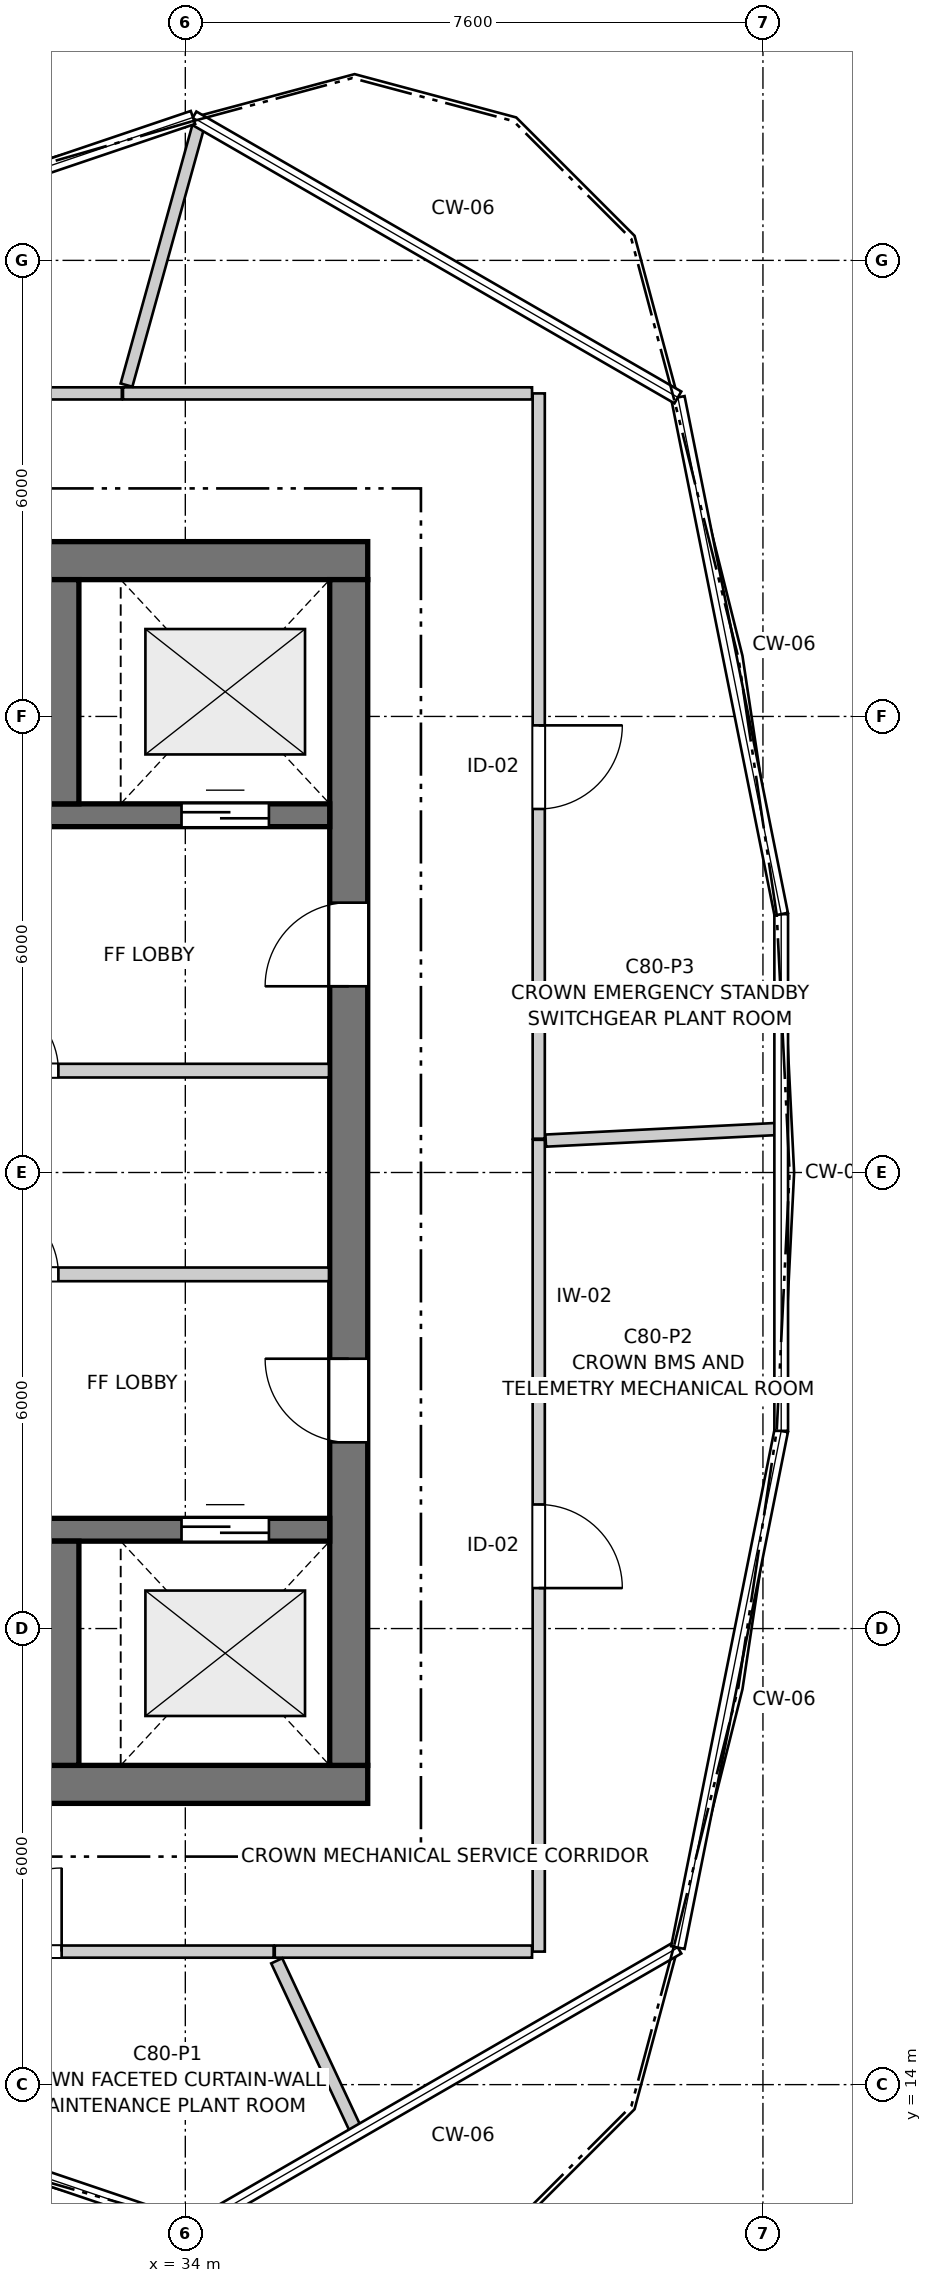
"""IFC4 building model, lengths in metres.
Left out: names, types, materials, properties, quantities, classifications, styles, units other than length and angle.
Written with IfcOpenShell. Run it as: python <this file> out.ifc"""

import sys

from ifc_helpers import new_model, si_unit, direction, frame, frame_2d, origin, place, context, subcontext, project, spatial, rectangle, extrude, source, transform, mapped, element, fill, save


model = new_model("IFC4")
c1 = context("Model", 3, precision=1e-05, world=origin(), true_north=direction((0.0, 1.0)))
c2 = subcontext(c1, "Body", "Model", "MODEL_VIEW")
j1 = project(units=[si_unit("LENGTHUNIT", "METRE"), si_unit("PLANEANGLEUNIT", "RADIAN")], contexts=[c1])
p1 = place(None, origin())
s1 = spatial("IfcSite", under=j1, at=p1, CompositionType="ELEMENT")
p2 = place(p1, origin())
s2 = spatial("IfcBuilding", under=s1, at=p2, CompositionType="ELEMENT")
p3 = place(p2, frame((0.0, 0.0, 270.4)))
s3 = spatial("IfcBuildingStorey", under=s2, at=p3, CompositionType="ELEMENT", Elevation=270.4)
for number, where, z_axis, x_axis in (
    (1, (24.3, 17.95, 0.0), (0.0, 0.0, 1.0), (1.0, 0.0, 0.0)),
    (2, (36.4, 34.05, 0.0), (0.0, 0.0, 1.0), (-1.0, 0.0, 0.0)),
):
    element("IfcWall", number, at=place(p3, frame(where, z_axis=z_axis, x_axis=x_axis)), inside=s3, PredefinedType="SHEAR", context=c2, shape_type="SweptSolid", body=[
        extrude(rectangle(XDim=12.1, YDim=0.5, at=frame_2d((6.05, 0.0))), origin(), (0.0, 0.0, 1.0), 4.05),
    ])
p4 = place(p3, frame((36.15, 18.2, 0.0), z_axis=(0.0, 0.0, 1.0), x_axis=(0.0, 1.0, 0.0)))
e3 = element("IfcWall", 3, at=p4, inside=s3, PredefinedType="SHEAR", context=c2, shape_type="SweptSolid", body=[
    extrude(rectangle(XDim=15.6, YDim=0.5, at=frame_2d((7.8, 0.0))), origin(), (0.0, 0.0, 1.0), 4.05),
])
p5 = place(p4, frame((4.25, 0.0, 0.0)))
e4 = element("IfcOpeningElement", 4, at=p5, cuts=e3, PredefinedType="OPENING", context=c2, shape_type="SweptSolid", body=[
    extrude(rectangle(XDim=1.1, YDim=2.15, at=frame_2d((0.55, 1.075))), frame((0.0, 0.26, 0.0), z_axis=(0.0, -1.0, 0.0), x_axis=(1.0, 0.0, 0.0)), (0.0, 0.0, 1.0), 0.52),
])
p6 = place(p4, frame((10.25, 0.0, 0.0)))
e5 = element("IfcOpeningElement", 5, at=p6, cuts=e3, PredefinedType="OPENING", context=c2, shape_type="SweptSolid", body=[
    extrude(rectangle(XDim=1.1, YDim=2.15, at=frame_2d((0.55, 1.075))), frame((0.0, 0.26, 0.0), z_axis=(0.0, -1.0, 0.0), x_axis=(1.0, 0.0, 0.0)), (0.0, 0.0, 1.0), 0.52),
])
p7 = place(p3, frame((24.8, 21.3, 0.0), z_axis=(0.0, 0.0, 1.0), x_axis=(1.0, 0.0, 0.0)))
e6 = element("IfcWall", 6, at=p7, inside=s3, PredefinedType="SHEAR", context=c2, shape_type="SweptSolid", body=[
    extrude(rectangle(XDim=11.1, YDim=0.3, at=frame_2d((5.55, 0.0))), origin(), (0.0, 0.0, 1.0), 4.05),
])
p8 = place(p7, frame((6.22, 0.0, 0.0)))
e7 = element("IfcOpeningElement", 7, at=p8, cuts=e6, PredefinedType="OPENING", context=c2, shape_type="SweptSolid", body=[
    extrude(rectangle(XDim=0.98, YDim=2.15, at=frame_2d((0.49, 1.075))), frame((0.0, 0.16, 0.0), z_axis=(0.0, -1.0, 0.0), x_axis=(1.0, 0.0, 0.0)), (0.0, 0.0, 1.0), 0.32),
])
p9 = place(p7, frame((9.15, 0.0, 0.0)))
e8 = element("IfcOpeningElement", 8, at=p9, cuts=e6, PredefinedType="OPENING", context=c2, shape_type="SweptSolid", body=[
    extrude(rectangle(XDim=1.15, YDim=2.15, at=frame_2d((0.575, 1.075))), frame((0.0, 0.16, 0.0), z_axis=(0.0, -1.0, 0.0), x_axis=(1.0, 0.0, 0.0)), (0.0, 0.0, 1.0), 0.32),
])
p10 = place(p3, frame((32.4, 18.2, 0.0), z_axis=(0.0, 0.0, 1.0), x_axis=(0.0, 1.0, 0.0)))
e9 = element("IfcWall", 9, at=p10, inside=s3, PredefinedType="SHEAR", context=c2, shape_type="SweptSolid", body=[
    extrude(rectangle(XDim=2.95, YDim=0.4, at=frame_2d((1.475, 0.0))), origin(), (0.0, 0.0, 1.0), 4.05),
])
p11 = place(p3, frame((24.8, 30.7, 0.0), z_axis=(0.0, 0.0, 1.0), x_axis=(1.0, 0.0, 0.0)))
e10 = element("IfcWall", 10, at=p11, inside=s3, PredefinedType="SHEAR", context=c2, shape_type="SweptSolid", body=[
    extrude(rectangle(XDim=11.1, YDim=0.3, at=frame_2d((5.55, 0.0))), origin(), (0.0, 0.0, 1.0), 4.05),
])
p12 = place(p11, frame((6.22, 0.0, 0.0)))
e11 = element("IfcOpeningElement", 11, at=p12, cuts=e10, PredefinedType="OPENING", context=c2, shape_type="SweptSolid", body=[
    extrude(rectangle(XDim=0.98, YDim=2.15, at=frame_2d((0.49, 1.075))), frame((0.0, 0.16, 0.0), z_axis=(0.0, -1.0, 0.0), x_axis=(1.0, 0.0, 0.0)), (0.0, 0.0, 1.0), 0.32),
])
p13 = place(p11, frame((9.15, 0.0, 0.0)))
e12 = element("IfcOpeningElement", 12, at=p13, cuts=e10, PredefinedType="OPENING", context=c2, shape_type="SweptSolid", body=[
    extrude(rectangle(XDim=1.15, YDim=2.15, at=frame_2d((0.575, 1.075))), frame((0.0, 0.16, 0.0), z_axis=(0.0, -1.0, 0.0), x_axis=(1.0, 0.0, 0.0)), (0.0, 0.0, 1.0), 0.32),
])
p14 = place(p3, frame((32.4, 30.85, 0.0), z_axis=(0.0, 0.0, 1.0), x_axis=(0.0, 1.0, 0.0)))
e13 = element("IfcWall", 13, at=p14, inside=s3, PredefinedType="SHEAR", context=c2, shape_type="SweptSolid", body=[
    extrude(rectangle(XDim=2.95, YDim=0.4, at=frame_2d((1.475, 0.0))), origin(), (0.0, 0.0, 1.0), 4.05),
])
p15 = place(p3, frame((30.67, 24.66, 0.0), z_axis=(0.0, 0.0, 1.0), x_axis=(1.0, 0.0, 0.0)))
e14 = element("IfcWall", 14, at=p15, inside=s3, PredefinedType="PARTITIONING", context=c2, shape_type="SweptSolid", body=[
    extrude(rectangle(XDim=5.22, YDim=0.18, at=frame_2d((2.61, 0.0))), origin(), (0.0, 0.0, 1.0), 4.05),
])
p16 = place(p15, frame((0.68, 0.0, 0.0)))
e15 = element("IfcOpeningElement", 15, at=p16, cuts=e14, PredefinedType="OPENING", context=c2, shape_type="SweptSolid", body=[
    extrude(rectangle(XDim=0.98, YDim=2.15, at=frame_2d((0.49, 1.075))), frame((0.0, 0.1, 0.0), z_axis=(0.0, -1.0, 0.0), x_axis=(1.0, 0.0, 0.0)), (0.0, 0.0, 1.0), 0.2),
])
p17 = place(p3, frame((30.67, 27.34, 0.0), z_axis=(0.0, 0.0, 1.0), x_axis=(1.0, 0.0, 0.0)))
e16 = element("IfcWall", 16, at=p17, inside=s3, PredefinedType="PARTITIONING", context=c2, shape_type="SweptSolid", body=[
    extrude(rectangle(XDim=5.22, YDim=0.18, at=frame_2d((2.61, 0.0))), origin(), (0.0, 0.0, 1.0), 4.05),
])
p18 = place(p17, frame((0.68, 0.0, 0.0)))
e17 = element("IfcOpeningElement", 17, at=p18, cuts=e16, PredefinedType="OPENING", context=c2, shape_type="SweptSolid", body=[
    extrude(rectangle(XDim=0.98, YDim=2.15, at=frame_2d((0.49, 1.075))), frame((0.0, 0.1, 0.0), z_axis=(0.0, -1.0, 0.0), x_axis=(1.0, 0.0, 0.0)), (0.0, 0.0, 1.0), 0.2),
])
p19 = place(p3, frame((38.65, 26.43, 0.0), z_axis=(0.0, 0.0, 1.0), x_axis=(0.0, -1.0, 0.0)))
e18 = element("IfcWall", 18, at=p19, inside=s3, PredefinedType="PARTITIONING", context=c2, shape_type="SweptSolid", body=[
    extrude(rectangle(XDim=10.68, YDim=0.16, at=frame_2d((5.34, 0.0))), origin(), (0.0, 0.0, 1.0), 4.05),
])
p20 = place(p19, frame((4.798, 0.0, 0.0)))
e19 = element("IfcOpeningElement", 19, at=p20, cuts=e18, PredefinedType="OPENING", context=c2, shape_type="SweptSolid", body=[
    extrude(rectangle(XDim=1.1, YDim=2.15, at=frame_2d((0.55, 1.075))), frame((0.0, 0.09, 0.0), z_axis=(0.0, -1.0, 0.0), x_axis=(1.0, 0.0, 0.0)), (0.0, 0.0, 1.0), 0.18),
])
p21 = place(p3, frame((38.65, 36.25, 0.0), z_axis=(0.0, 0.0, 1.0), x_axis=(0.0, -1.0, 0.0)))
e20 = element("IfcWall", 20, at=p21, inside=s3, PredefinedType="PARTITIONING", context=c2, shape_type="SweptSolid", body=[
    extrude(rectangle(XDim=9.805, YDim=0.16, at=frame_2d((4.902, 0.0))), origin(), (0.0, 0.0, 1.0), 4.05),
])
p22 = place(p21, frame((4.367, 0.0, 0.0)))
e21 = element("IfcOpeningElement", 21, at=p22, cuts=e20, PredefinedType="OPENING", context=c2, shape_type="SweptSolid", body=[
    extrude(rectangle(XDim=1.1, YDim=2.15, at=frame_2d((0.55, 1.075))), frame((0.0, 0.09, 0.0), z_axis=(0.0, -1.0, 0.0), x_axis=(1.0, 0.0, 0.0)), (0.0, 0.0, 1.0), 0.18),
])
p23 = place(p3, frame((28.5, 15.75, 0.0), z_axis=(0.0, 0.0, 1.0), x_axis=(1.0, 0.0, 0.0)))
e22 = element("IfcWall", 22, at=p23, inside=s3, PredefinedType="PARTITIONING", context=c2, shape_type="SweptSolid", body=[
    extrude(rectangle(XDim=6.662, YDim=0.16, at=frame_2d((3.331, 0.0))), origin(), (0.0, 0.0, 1.0), 4.05),
])
p24 = place(p23, frame((2.773, 0.0, 0.0)))
e23 = element("IfcOpeningElement", 23, at=p24, cuts=e22, PredefinedType="OPENING", context=c2, shape_type="SweptSolid", body=[
    extrude(rectangle(XDim=1.1, YDim=2.15, at=frame_2d((0.55, 1.075))), frame((0.0, 0.09, 0.0), z_axis=(0.0, -1.0, 0.0), x_axis=(1.0, 0.0, 0.0)), (0.0, 0.0, 1.0), 0.18),
])
p25 = place(p3, frame((33.165, 36.25, 0.0), z_axis=(0.0, 0.0, 1.0), x_axis=(-1.0, 0.0, 0.0)))
e24 = element("IfcWall", 24, at=p25, inside=s3, PredefinedType="PARTITIONING", context=c2, shape_type="SweptSolid", body=[
    extrude(rectangle(XDim=4.665, YDim=0.16, at=frame_2d((2.333, 0.0))), origin(), (0.0, 0.0, 1.0), 4.05),
])
p26 = place(p25, frame((1.767, 0.0, 0.0)))
e25 = element("IfcOpeningElement", 25, at=p26, cuts=e24, PredefinedType="OPENING", context=c2, shape_type="SweptSolid", body=[
    extrude(rectangle(XDim=1.1, YDim=2.15, at=frame_2d((0.55, 1.075))), frame((0.0, 0.09, 0.0), z_axis=(0.0, -1.0, 0.0), x_axis=(1.0, 0.0, 0.0)), (0.0, 0.0, 1.0), 0.18),
])
p27 = place(p3, frame((33.18, 36.25, 0.0), z_axis=(0.0, 0.0, 1.0), x_axis=(1.0, 0.0, 0.0)))
e26 = element("IfcWall", 26, at=p27, inside=s3, PredefinedType="PARTITIONING", context=c2, shape_type="SweptSolid", body=[
    extrude(rectangle(XDim=5.382, YDim=0.16, at=frame_2d((2.691, 0.0))), origin(), (0.0, 0.0, 1.0), 4.05),
])
p28 = place(p3, frame((33.226, 36.359, 0.0), z_axis=(0.0, 0.0, 1.0), x_axis=(0.267305613855, 0.963611803997, 0.0)))
e27 = element("IfcWall", 27, at=p28, inside=s3, PredefinedType="PARTITIONING", context=c2, shape_type="SweptSolid", body=[
    extrude(rectangle(XDim=3.574, YDim=0.16, at=frame_2d((1.787, 0.0))), origin(), (0.0, 0.0, 1.0), 3.318),
])
p29 = place(p3, frame((35.177, 15.75, 0.0), z_axis=(0.0, 0.0, 1.0), x_axis=(1.0, 0.0, 0.0)))
e28 = element("IfcWall", 28, at=p29, inside=s3, PredefinedType="PARTITIONING", context=c2, shape_type="SweptSolid", body=[
    extrude(rectangle(XDim=3.385, YDim=0.16, at=frame_2d((1.692, 0.0))), origin(), (0.0, 0.0, 1.0), 4.05),
])
p30 = place(p3, frame((38.742, 26.42, 0.0), z_axis=(0.0, 0.0, 1.0), x_axis=(0.998740431648, 0.050175194976, 0.0)))
e29 = element("IfcWall", 29, at=p30, inside=s3, PredefinedType="PARTITIONING", context=c2, shape_type="SweptSolid", body=[
    extrude(rectangle(XDim=3.075, YDim=0.16, at=frame_2d((1.538, 0.0))), origin(), (0.0, 0.0, 1.0), 4.05),
])
p31 = place(p3, frame((35.203, 15.629, 0.0), z_axis=(0.0, 0.0, 1.0), x_axis=(0.423577860937, -0.905859699801, 0.0)))
e30 = element("IfcWall", 30, at=p31, inside=s3, PredefinedType="PARTITIONING", context=c2, shape_type="SweptSolid", body=[
    extrude(rectangle(XDim=2.47, YDim=0.16, at=frame_2d((1.235, 0.0))), origin(), (0.0, 0.0, 1.0), 4.05),
])
m1 = source(origin(), c2, "Body", "SweptSolid", [
    extrude(rectangle(XDim=1.15, YDim=2.15, at=frame_2d((0.575, 1.075))), frame((0.0, 0.025, 0.0), z_axis=(0.0, -1.0, 0.0), x_axis=(1.0, 0.0, 0.0)), (0.0, 0.0, 1.0), 0.05),
])
p32 = place(p9, origin())
e31 = element("IfcDoor", 31, at=p32, inside=s3, OperationType="DOUBLE_DOOR_SLIDING", PredefinedType="DOOR", context=c2, shape_type="MappedRepresentation", body=[
    mapped(m1, transform((0.0, 0.0, 0.0), x_axis=(1.0, 0.0, 0.0), y_axis=(0.0, 1.0, 0.0), z_axis=(0.0, 0.0, 1.0), scale=1.0)),
])
fill(e8, e31)
p33 = place(p13, origin())
e32 = element("IfcDoor", 32, at=p33, inside=s3, OperationType="DOUBLE_DOOR_SLIDING", PredefinedType="DOOR", context=c2, shape_type="MappedRepresentation", body=[
    mapped(m1, transform((0.0, 0.0, 0.0), x_axis=(1.0, 0.0, 0.0), y_axis=(0.0, 1.0, 0.0), z_axis=(0.0, 0.0, 1.0), scale=1.0)),
])
fill(e12, e32)
m2 = source(origin(), c2, "Body", "SweptSolid", [
    extrude(rectangle(XDim=1.1, YDim=2.15, at=frame_2d((0.55, 1.075))), frame((0.0, 0.025, 0.0), z_axis=(0.0, -1.0, 0.0), x_axis=(1.0, 0.0, 0.0)), (0.0, 0.0, 1.0), 0.05),
])
p34 = place(p5, origin())
e33 = element("IfcDoor", 33, at=p34, inside=s3, OperationType="SINGLE_SWING_RIGHT", PredefinedType="DOOR", context=c2, shape_type="MappedRepresentation", body=[
    mapped(m2, transform((0.0, 0.0, 0.0), x_axis=(1.0, 0.0, 0.0), y_axis=(0.0, 1.0, 0.0), z_axis=(0.0, 0.0, 1.0), scale=1.0)),
])
fill(e4, e33)
p35 = place(p6, origin())
e34 = element("IfcDoor", 34, at=p35, inside=s3, OperationType="SINGLE_SWING_LEFT", PredefinedType="DOOR", context=c2, shape_type="MappedRepresentation", body=[
    mapped(m2, transform((0.0, 0.0, 0.0), x_axis=(1.0, 0.0, 0.0), y_axis=(0.0, 1.0, 0.0), z_axis=(0.0, 0.0, 1.0), scale=1.0)),
])
fill(e5, e34)
m3 = source(origin(), c2, "Body", "SweptSolid", [
    extrude(rectangle(XDim=0.98, YDim=2.15, at=frame_2d((0.49, 1.075))), frame((0.0, 0.025, 0.0), z_axis=(0.0, -1.0, 0.0), x_axis=(1.0, 0.0, 0.0)), (0.0, 0.0, 1.0), 0.05),
])
p36 = place(p16, origin())
e35 = element("IfcDoor", 35, at=p36, inside=s3, OperationType="SINGLE_SWING_LEFT", PredefinedType="DOOR", context=c2, shape_type="MappedRepresentation", body=[
    mapped(m3, transform((0.0, 0.0, 0.0), x_axis=(1.0, 0.0, 0.0), y_axis=(0.0, 1.0, 0.0), z_axis=(0.0, 0.0, 1.0), scale=1.0)),
])
fill(e15, e35)
p37 = place(p18, origin())
e36 = element("IfcDoor", 36, at=p37, inside=s3, OperationType="SINGLE_SWING_LEFT", PredefinedType="DOOR", context=c2, shape_type="MappedRepresentation", body=[
    mapped(m3, transform((0.0, 0.0, 0.0), x_axis=(1.0, 0.0, 0.0), y_axis=(0.0, 1.0, 0.0), z_axis=(0.0, 0.0, 1.0), scale=1.0)),
])
fill(e17, e36)
p38 = place(p20, origin())
e37 = element("IfcDoor", 37, at=p38, inside=s3, OperationType="SINGLE_SWING_RIGHT", PredefinedType="DOOR", context=c2, shape_type="MappedRepresentation", body=[
    mapped(m2, transform((0.0, 0.0, 0.0), x_axis=(1.0, 0.0, 0.0), y_axis=(0.0, 1.0, 0.0), z_axis=(0.0, 0.0, 1.0), scale=1.0)),
])
fill(e19, e37)
p39 = place(p22, origin())
e38 = element("IfcDoor", 38, at=p39, inside=s3, OperationType="SINGLE_SWING_LEFT", PredefinedType="DOOR", context=c2, shape_type="MappedRepresentation", body=[
    mapped(m2, transform((0.0, 0.0, 0.0), x_axis=(1.0, 0.0, 0.0), y_axis=(0.0, 1.0, 0.0), z_axis=(0.0, 0.0, 1.0), scale=1.0)),
])
fill(e21, e38)
p40 = place(p24, origin())
e39 = element("IfcDoor", 39, at=p40, inside=s3, OperationType="SINGLE_SWING_RIGHT", PredefinedType="DOOR", context=c2, shape_type="MappedRepresentation", body=[
    mapped(m2, transform((0.0, 0.0, 0.0), x_axis=(1.0, 0.0, 0.0), y_axis=(0.0, 1.0, 0.0), z_axis=(0.0, 0.0, 1.0), scale=1.0)),
])
fill(e23, e39)
save(model, sys.argv[1])
